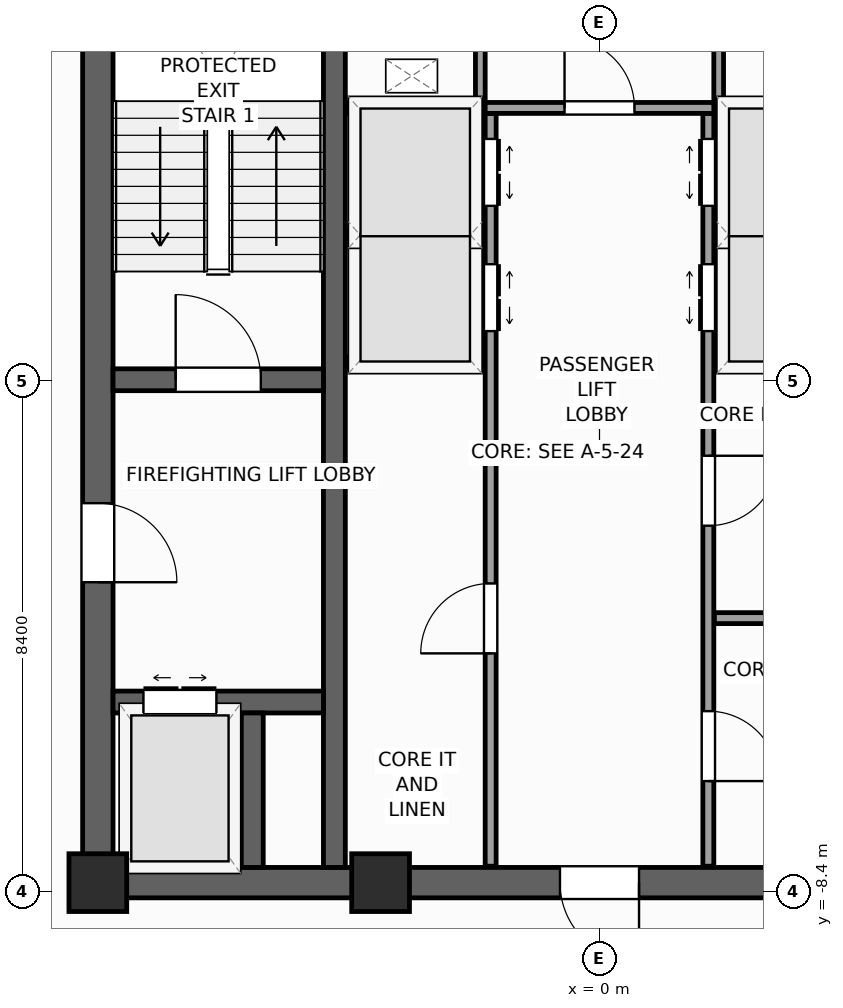
"""IFC4 building model, lengths in metres.
Left out: names, types, materials, properties, quantities, classifications, styles, units other than length and angle.
Written with IfcOpenShell. Run it as: python <this file> out.ifc"""

import sys

from ifc_helpers import new_model, si_unit, direction, frame, frame_2d, origin, origin_2d, place, context, subcontext, project, spatial, rectangle, extrude, source, transform, mapped, element, fill, save


model = new_model("IFC4")
c1 = context("Model", 3, precision=1e-05, world=origin(), true_north=direction((0.0, 1.0)))
c2 = subcontext(c1, "Body", "Model", "MODEL_VIEW")
j1 = project(units=[si_unit("LENGTHUNIT", "METRE"), si_unit("PLANEANGLEUNIT", "RADIAN")], contexts=[c1])
p1 = place(None, origin())
s1 = spatial("IfcSite", under=j1, at=p1, CompositionType="ELEMENT")
p2 = place(p1, origin())
s2 = spatial("IfcBuilding", under=s1, at=p2, CompositionType="ELEMENT")
p3 = place(p2, frame((0.0, 0.0, 240.7)))
s3 = spatial("IfcBuildingStorey", under=s2, at=p3, CompositionType="ELEMENT", Elevation=240.7)
p4 = place(p3, frame((-8.5, -8.25, 0.0), z_axis=(0.0, 0.0, 1.0), x_axis=(1.0, 0.0, 0.0)))
e1 = element("IfcWall", 1, at=p4, inside=s3, PredefinedType="SHEAR", context=c2, shape_type="SweptSolid", body=[
    extrude(rectangle(XDim=17.0, YDim=0.5, at=frame_2d((8.5, 0.0))), origin(), (0.0, 0.0, 1.0), 3.9),
])
p5 = place(p4, frame((7.85, 0.0, 0.0)))
e2 = element("IfcOpeningElement", 2, at=p5, cuts=e1, PredefinedType="OPENING", context=c2, shape_type="SweptSolid", body=[
    extrude(rectangle(XDim=1.3, YDim=2.2, at=frame_2d((0.65, 1.1))), frame((0.0, 0.26, 0.0), z_axis=(0.0, -1.0, 0.0), x_axis=(1.0, 0.0, 0.0)), (0.0, 0.0, 1.0), 0.52),
])
p6 = place(p3, frame((-8.25, -8.0, 0.0), z_axis=(0.0, 0.0, 1.0), x_axis=(0.0, 1.0, 0.0)))
e3 = element("IfcWall", 3, at=p6, inside=s3, PredefinedType="SHEAR", context=c2, shape_type="SweptSolid", body=[
    extrude(rectangle(XDim=16.0, YDim=0.5, at=frame_2d((8.0, 0.0))), origin(), (0.0, 0.0, 1.0), 3.9),
])
p7 = place(p6, frame((4.69, 0.0, 0.0)))
e4 = element("IfcOpeningElement", 4, at=p7, cuts=e3, PredefinedType="OPENING", context=c2, shape_type="SweptSolid", body=[
    extrude(rectangle(XDim=1.3, YDim=2.2, at=frame_2d((0.65, 1.1))), frame((0.0, 0.26, 0.0), z_axis=(0.0, -1.0, 0.0), x_axis=(1.0, 0.0, 0.0)), (0.0, 0.0, 1.0), 0.52),
])
p8 = place(p3, frame((-4.36, -8.0, 0.0), z_axis=(0.0, 0.0, 1.0), x_axis=(0.0, 1.0, 0.0)))
e5 = element("IfcWall", 5, at=p8, inside=s3, PredefinedType="SHEAR", context=c2, shape_type="SweptSolid", body=[
    extrude(rectangle(XDim=16.0, YDim=0.36, at=frame_2d((8.0, 0.0))), origin(), (0.0, 0.0, 1.0), 3.9),
])
p9 = place(p3, frame((-8.0, 0.02, 0.0), z_axis=(0.0, 0.0, 1.0), x_axis=(1.0, 0.0, 0.0)))
e6 = element("IfcWall", 6, at=p9, inside=s3, PredefinedType="SHEAR", context=c2, shape_type="SweptSolid", body=[
    extrude(rectangle(XDim=3.46, YDim=0.36, at=frame_2d((1.73, 0.0))), origin(), (0.0, 0.0, 1.0), 3.9),
])
p10 = place(p9, frame((1.03, 0.0, 0.0)))
e7 = element("IfcOpeningElement", 7, at=p10, cuts=e6, PredefinedType="OPENING", context=c2, shape_type="SweptSolid", body=[
    extrude(rectangle(XDim=1.4, YDim=2.2, at=frame_2d((0.7, 1.1))), frame((0.0, 0.19, 0.0), z_axis=(0.0, -1.0, 0.0), x_axis=(1.0, 0.0, 0.0)), (0.0, 0.0, 1.0), 0.38),
])
p11 = place(p3, frame((-8.0, -5.28, 0.0), z_axis=(0.0, 0.0, 1.0), x_axis=(1.0, 0.0, 0.0)))
e8 = element("IfcWall", 8, at=p11, inside=s3, PredefinedType="SHEAR", context=c2, shape_type="SweptSolid", body=[
    extrude(rectangle(XDim=3.46, YDim=0.36, at=frame_2d((1.73, 0.0))), origin(), (0.0, 0.0, 1.0), 3.9),
])
p12 = place(p11, frame((0.5, 0.0, 0.0)))
e9 = element("IfcOpeningElement", 9, at=p12, cuts=e8, PredefinedType="OPENING", context=c2, shape_type="SweptSolid", body=[
    extrude(rectangle(XDim=1.2, YDim=2.25, at=frame_2d((0.6, 1.125))), frame((0.0, 0.19, 0.0), z_axis=(0.0, -1.0, 0.0), x_axis=(1.0, 0.0, 0.0)), (0.0, 0.0, 1.0), 0.38),
])
p13 = place(p3, frame((-5.71, -8.0, 0.0), z_axis=(0.0, 0.0, 1.0), x_axis=(0.0, 1.0, 0.0)))
e10 = element("IfcWall", 10, at=p13, inside=s3, PredefinedType="SHEAR", context=c2, shape_type="SweptSolid", body=[
    extrude(rectangle(XDim=2.54, YDim=0.36, at=frame_2d((1.27, 0.0))), origin(), (0.0, 0.0, 1.0), 3.9),
])
m1 = source(origin(), c2, "Body", "SweptSolid", [
    extrude(rectangle(XDim=0.95, YDim=0.95, at=origin_2d()), origin(), (0.0, 0.0, 1.0), 3.9),
])
for number, where, z_axis, x_axis in (
    (11, (-8.25, -8.25, 0.0), (0.0, 0.0, 1.0), (1.0, 0.0, 0.0)),
    (12, (-3.6, -8.25, 0.0), (0.0, 0.0, 1.0), (1.0, 0.0, 0.0)),
):
    element("IfcColumn", number, at=place(p3, frame(where, z_axis=z_axis, x_axis=x_axis)), inside=s3, PredefinedType="PILASTER", context=c2, shape_type="MappedRepresentation", body=[
        mapped(m1, transform((0.0, 0.0, 0.0), scale=1.0)),
    ])
p14 = place(p3, frame((-6.733, 29.154, 0.0), z_axis=(0.0, 0.0, 1.0), x_axis=(-0.629325378072, -0.77714192302, 0.0)))
e13 = element("IfcWall", 13, at=p14, inside=s3, PredefinedType="STANDARD", context=c2, shape_type="SweptSolid", body=[
    extrude(rectangle(XDim=36.84, YDim=0.34, at=frame_2d((18.42, 0.0))), origin(), (0.0, 0.0, 1.0), 2.96),
])
p15 = place(p14, frame((3.721, 0.0, 0.48)))
e14 = element("IfcOpeningElement", 14, at=p15, cuts=e13, PredefinedType="OPENING", context=c2, shape_type="SweptSolid", body=[
    extrude(rectangle(XDim=1.4, YDim=2.4, at=frame_2d((0.7, 1.2))), frame((0.0, 0.18, 0.0), z_axis=(0.0, -1.0, 0.0), x_axis=(1.0, 0.0, 0.0)), (0.0, 0.0, 1.0), 0.36),
])
p16 = place(p14, frame((10.559, 0.0, 0.58)))
e15 = element("IfcOpeningElement", 15, at=p16, cuts=e13, PredefinedType="OPENING", context=c2, shape_type="SweptSolid", body=[
    extrude(rectangle(XDim=1.75, YDim=2.3, at=frame_2d((0.875, 1.15))), frame((0.0, 0.18, 0.0), z_axis=(0.0, -1.0, 0.0), x_axis=(1.0, 0.0, 0.0)), (0.0, 0.0, 1.0), 0.36),
])
p17 = place(p14, frame((16.058, 0.0, 0.58)))
e16 = element("IfcOpeningElement", 16, at=p17, cuts=e13, PredefinedType="OPENING", context=c2, shape_type="SweptSolid", body=[
    extrude(rectangle(XDim=1.75, YDim=2.3, at=frame_2d((0.875, 1.15))), frame((0.0, 0.18, 0.0), z_axis=(0.0, -1.0, 0.0), x_axis=(1.0, 0.0, 0.0)), (0.0, 0.0, 1.0), 0.36),
])
p18 = place(p14, frame((24.176, 0.0, 0.58)))
e17 = element("IfcOpeningElement", 17, at=p18, cuts=e13, PredefinedType="OPENING", context=c2, shape_type="SweptSolid", body=[
    extrude(rectangle(XDim=1.75, YDim=2.3, at=frame_2d((0.875, 1.15))), frame((0.0, 0.18, 0.0), z_axis=(0.0, -1.0, 0.0), x_axis=(1.0, 0.0, 0.0)), (0.0, 0.0, 1.0), 0.36),
])
p19 = place(p14, frame((30.982, 0.0, 0.48)))
e18 = element("IfcOpeningElement", 18, at=p19, cuts=e13, PredefinedType="OPENING", context=c2, shape_type="SweptSolid", body=[
    extrude(rectangle(XDim=1.4, YDim=2.4, at=frame_2d((0.7, 1.2))), frame((0.0, 0.18, 0.0), z_axis=(0.0, -1.0, 0.0), x_axis=(1.0, 0.0, 0.0)), (0.0, 0.0, 1.0), 0.36),
])
p20 = place(p3, frame((-29.154, -6.733, 0.0), z_axis=(0.0, 0.0, 1.0), x_axis=(0.77714192302, -0.629325378072, 0.0)))
e19 = element("IfcWall", 19, at=p20, inside=s3, PredefinedType="STANDARD", context=c2, shape_type="SweptSolid", body=[
    extrude(rectangle(XDim=36.84, YDim=0.34, at=frame_2d((18.42, 0.0))), origin(), (0.0, 0.0, 1.0), 2.96),
])
p21 = place(p20, frame((23.495, 0.0, 0.0)))
e20 = element("IfcOpeningElement", 20, at=p21, cuts=e19, PredefinedType="OPENING", context=c2, shape_type="SweptSolid", body=[
    extrude(rectangle(XDim=1.05, YDim=2.25, at=frame_2d((0.525, 1.125))), frame((0.0, 0.18, 0.0), z_axis=(0.0, -1.0, 0.0), x_axis=(1.0, 0.0, 0.0)), (0.0, 0.0, 1.0), 0.36),
])
p22 = place(p20, frame((3.721, 0.0, 0.48)))
e21 = element("IfcOpeningElement", 21, at=p22, cuts=e19, PredefinedType="OPENING", context=c2, shape_type="SweptSolid", body=[
    extrude(rectangle(XDim=1.4, YDim=2.4, at=frame_2d((0.7, 1.2))), frame((0.0, 0.18, 0.0), z_axis=(0.0, -1.0, 0.0), x_axis=(1.0, 0.0, 0.0)), (0.0, 0.0, 1.0), 0.36),
])
p23 = place(p20, frame((9.809, 0.0, 0.58)))
e22 = element("IfcOpeningElement", 22, at=p23, cuts=e19, PredefinedType="OPENING", context=c2, shape_type="SweptSolid", body=[
    extrude(rectangle(XDim=1.75, YDim=2.3, at=frame_2d((0.875, 1.15))), frame((0.0, 0.18, 0.0), z_axis=(0.0, -1.0, 0.0), x_axis=(1.0, 0.0, 0.0)), (0.0, 0.0, 1.0), 0.36),
])
p24 = place(p20, frame((16.058, 0.0, 0.58)))
e23 = element("IfcOpeningElement", 23, at=p24, cuts=e19, PredefinedType="OPENING", context=c2, shape_type="SweptSolid", body=[
    extrude(rectangle(XDim=1.75, YDim=2.3, at=frame_2d((0.875, 1.15))), frame((0.0, 0.18, 0.0), z_axis=(0.0, -1.0, 0.0), x_axis=(1.0, 0.0, 0.0)), (0.0, 0.0, 1.0), 0.36),
])
p25 = place(p20, frame((25.676, 0.0, 0.58)))
e24 = element("IfcOpeningElement", 24, at=p25, cuts=e19, PredefinedType="OPENING", context=c2, shape_type="SweptSolid", body=[
    extrude(rectangle(XDim=1.75, YDim=2.3, at=frame_2d((0.875, 1.15))), frame((0.0, 0.18, 0.0), z_axis=(0.0, -1.0, 0.0), x_axis=(1.0, 0.0, 0.0)), (0.0, 0.0, 1.0), 0.36),
])
p26 = place(p20, frame((32.482, 0.0, 0.48)))
e25 = element("IfcOpeningElement", 25, at=p26, cuts=e19, PredefinedType="OPENING", context=c2, shape_type="SweptSolid", body=[
    extrude(rectangle(XDim=1.4, YDim=2.4, at=frame_2d((0.7, 1.2))), frame((0.0, 0.18, 0.0), z_axis=(0.0, -1.0, 0.0), x_axis=(1.0, 0.0, 0.0)), (0.0, 0.0, 1.0), 0.36),
])
p27 = place(p3, frame((-1.79, -7.98, 0.0), z_axis=(0.0, 0.0, 1.0), x_axis=(0.0, 1.0, 0.0)))
e26 = element("IfcWall", 26, at=p27, inside=s3, PredefinedType="PARTITIONING", context=c2, shape_type="SweptSolid", body=[
    extrude(rectangle(XDim=12.38, YDim=0.18, at=frame_2d((6.19, 0.0))), origin(), (0.0, 0.0, 1.0), 3.66),
])
p28 = place(p27, frame((8.8, 0.0, 0.0)))
e27 = element("IfcOpeningElement", 27, at=p28, cuts=e26, PredefinedType="OPENING", context=c2, shape_type="SweptSolid", body=[
    extrude(rectangle(XDim=1.1, YDim=2.2, at=frame_2d((0.55, 1.1))), frame((0.0, 0.1, 0.0), z_axis=(0.0, -1.0, 0.0), x_axis=(1.0, 0.0, 0.0)), (0.0, 0.0, 1.0), 0.2),
])
p29 = place(p27, frame((10.86, 0.0, 0.0)))
e28 = element("IfcOpeningElement", 28, at=p29, cuts=e26, PredefinedType="OPENING", context=c2, shape_type="SweptSolid", body=[
    extrude(rectangle(XDim=1.1, YDim=2.2, at=frame_2d((0.55, 1.1))), frame((0.0, 0.1, 0.0), z_axis=(0.0, -1.0, 0.0), x_axis=(1.0, 0.0, 0.0)), (0.0, 0.0, 1.0), 0.2),
])
p30 = place(p27, frame((3.5, 0.0, 0.0)))
e29 = element("IfcOpeningElement", 29, at=p30, cuts=e26, PredefinedType="OPENING", context=c2, shape_type="SweptSolid", body=[
    extrude(rectangle(XDim=1.15, YDim=2.25, at=frame_2d((0.575, 1.125))), frame((0.0, 0.1, 0.0), z_axis=(0.0, -1.0, 0.0), x_axis=(1.0, 0.0, 0.0)), (0.0, 0.0, 1.0), 0.2),
])
p31 = place(p3, frame((1.79, -7.98, 0.0), z_axis=(0.0, 0.0, 1.0), x_axis=(0.0, 1.0, 0.0)))
e30 = element("IfcWall", 30, at=p31, inside=s3, PredefinedType="PARTITIONING", context=c2, shape_type="SweptSolid", body=[
    extrude(rectangle(XDim=12.38, YDim=0.18, at=frame_2d((6.19, 0.0))), origin(), (0.0, 0.0, 1.0), 3.66),
])
p32 = place(p31, frame((8.8, 0.0, 0.0)))
e31 = element("IfcOpeningElement", 31, at=p32, cuts=e30, PredefinedType="OPENING", context=c2, shape_type="SweptSolid", body=[
    extrude(rectangle(XDim=1.1, YDim=2.2, at=frame_2d((0.55, 1.1))), frame((0.0, 0.1, 0.0), z_axis=(0.0, -1.0, 0.0), x_axis=(1.0, 0.0, 0.0)), (0.0, 0.0, 1.0), 0.2),
])
p33 = place(p31, frame((10.86, 0.0, 0.0)))
e32 = element("IfcOpeningElement", 32, at=p33, cuts=e30, PredefinedType="OPENING", context=c2, shape_type="SweptSolid", body=[
    extrude(rectangle(XDim=1.1, YDim=2.2, at=frame_2d((0.55, 1.1))), frame((0.0, 0.1, 0.0), z_axis=(0.0, -1.0, 0.0), x_axis=(1.0, 0.0, 0.0)), (0.0, 0.0, 1.0), 0.2),
])
p34 = place(p31, frame((1.4, 0.0, 0.0)))
e33 = element("IfcOpeningElement", 33, at=p34, cuts=e30, PredefinedType="OPENING", context=c2, shape_type="SweptSolid", body=[
    extrude(rectangle(XDim=1.15, YDim=2.25, at=frame_2d((0.575, 1.125))), frame((0.0, 0.1, 0.0), z_axis=(0.0, -1.0, 0.0), x_axis=(1.0, 0.0, 0.0)), (0.0, 0.0, 1.0), 0.2),
])
p35 = place(p31, frame((5.6, 0.0, 0.0)))
e34 = element("IfcOpeningElement", 34, at=p35, cuts=e30, PredefinedType="OPENING", context=c2, shape_type="SweptSolid", body=[
    extrude(rectangle(XDim=1.15, YDim=2.25, at=frame_2d((0.575, 1.125))), frame((0.0, 0.1, 0.0), z_axis=(0.0, -1.0, 0.0), x_axis=(1.0, 0.0, 0.0)), (0.0, 0.0, 1.0), 0.2),
])
p36 = place(p3, frame((-1.88, 4.49, 0.0), z_axis=(0.0, 0.0, 1.0), x_axis=(1.0, 0.0, 0.0)))
e35 = element("IfcWall", 35, at=p36, inside=s3, PredefinedType="PARTITIONING", context=c2, shape_type="SweptSolid", body=[
    extrude(rectangle(XDim=3.76, YDim=0.18, at=frame_2d((1.88, 0.0))), origin(), (0.0, 0.0, 1.0), 3.66),
])
p37 = place(p36, frame((1.305, 0.0, 0.0)))
e36 = element("IfcOpeningElement", 36, at=p37, cuts=e35, PredefinedType="OPENING", context=c2, shape_type="SweptSolid", body=[
    extrude(rectangle(XDim=1.15, YDim=2.25, at=frame_2d((0.575, 1.125))), frame((0.0, 0.1, 0.0), z_axis=(0.0, -1.0, 0.0), x_axis=(1.0, 0.0, 0.0)), (0.0, 0.0, 1.0), 0.2),
])
for number, where, z_axis, x_axis in (
    (37, (1.89, -3.9, 0.0), (0.0, 0.0, 1.0), (1.0, 0.0, 0.0)),
    (38, (-4.17, 0.3, 0.0), (0.0, 0.0, 1.0), (1.0, 0.0, 0.0)),
    (39, (1.89, 0.3, 0.0), (0.0, 0.0, 1.0), (1.0, 0.0, 0.0)),
    (40, (-4.17, 4.49, 0.0), (0.0, 0.0, 1.0), (1.0, 0.0, 0.0)),
    (41, (1.89, 4.49, 0.0), (0.0, 0.0, 1.0), (1.0, 0.0, 0.0)),
):
    element("IfcWall", number, at=place(p3, frame(where, z_axis=z_axis, x_axis=x_axis)), inside=s3, PredefinedType="PARTITIONING", context=c2, shape_type="SweptSolid", body=[
        extrude(rectangle(XDim=2.28, YDim=0.18, at=frame_2d((1.14, 0.0))), origin(), (0.0, 0.0, 1.0), 3.66),
    ])
for number, where, z_axis, x_axis in (
    (42, (-4.16, 2.4, 0.0), (0.0, 0.0, 1.0), (1.0, 0.0, 0.0)),
    (43, (1.9, 2.4, 0.0), (0.0, 0.0, 1.0), (1.0, 0.0, 0.0)),
):
    element("IfcWall", number, at=place(p3, frame(where, z_axis=z_axis, x_axis=x_axis)), inside=s3, PredefinedType="PARTITIONING", context=c2, shape_type="SweptSolid", body=[
        extrude(rectangle(XDim=2.26, YDim=0.12, at=frame_2d((1.13, 0.0))), origin(), (0.0, 0.0, 1.0), 3.66),
    ])
for number, where, z_axis, x_axis in (
    (44, (-1.96, 4.58, 0.0), (0.0, 0.0, 1.0), (0.0, 1.0, 0.0)),
    (45, (1.96, 4.58, 0.0), (0.0, 0.0, 1.0), (0.0, 1.0, 0.0)),
):
    element("IfcWall", number, at=place(p3, frame(where, z_axis=z_axis, x_axis=x_axis)), inside=s3, PredefinedType="PARTITIONING", context=c2, shape_type="SweptSolid", body=[
        extrude(rectangle(XDim=3.4, YDim=0.16, at=frame_2d((1.7, 0.0))), origin(), (0.0, 0.0, 1.0), 3.66),
    ])
m2 = source(origin(), c2, "Body", "SweptSolid", [
    extrude(rectangle(XDim=1.4, YDim=2.2, at=frame_2d((0.7, 1.1))), frame((0.0, 0.025, 0.0), z_axis=(0.0, -1.0, 0.0), x_axis=(1.0, 0.0, 0.0)), (0.0, 0.0, 1.0), 0.05),
])
p38 = place(p10, origin())
e46 = element("IfcDoor", 46, at=p38, inside=s3, OperationType="SINGLE_SWING_LEFT", PredefinedType="DOOR", context=c2, shape_type="MappedRepresentation", body=[
    mapped(m2, transform((0.0, 0.0, 0.0), scale=1.0)),
])
fill(e7, e46)
m3 = source(origin(), c2, "Body", "SweptSolid", [
    extrude(rectangle(XDim=1.3, YDim=2.2, at=frame_2d((0.65, 1.1))), frame((0.0, 0.025, 0.0), z_axis=(0.0, -1.0, 0.0), x_axis=(1.0, 0.0, 0.0)), (0.0, 0.0, 1.0), 0.05),
])
p39 = place(p7, frame((1.3, 0.0, 0.0), z_axis=(0.0, 0.0, 1.0), x_axis=(-1.0, 0.0, 0.0)))
e47 = element("IfcDoor", 47, at=p39, inside=s3, OperationType="SINGLE_SWING_LEFT", PredefinedType="DOOR", context=c2, shape_type="MappedRepresentation", body=[
    mapped(m3, transform((0.0, 0.0, 0.0), scale=1.0)),
])
fill(e4, e47)
p40 = place(p5, frame((1.3, 0.0, 0.0), z_axis=(0.0, 0.0, 1.0), x_axis=(-1.0, 0.0, 0.0)))
e48 = element("IfcDoor", 48, at=p40, inside=s3, OperationType="SINGLE_SWING_RIGHT", PredefinedType="DOOR", context=c2, shape_type="MappedRepresentation", body=[
    mapped(m3, transform((0.0, 0.0, 0.0), scale=1.0)),
])
fill(e2, e48)
m4 = source(origin(), c2, "Body", "SweptSolid", [
    extrude(rectangle(XDim=1.2, YDim=2.25, at=frame_2d((0.6, 1.125))), frame((0.0, 0.025, 0.0), z_axis=(0.0, -1.0, 0.0), x_axis=(1.0, 0.0, 0.0)), (0.0, 0.0, 1.0), 0.05),
])
p41 = place(p12, origin())
e49 = element("IfcDoor", 49, at=p41, inside=s3, OperationType="DOUBLE_DOOR_SLIDING", PredefinedType="DOOR", context=c2, shape_type="MappedRepresentation", body=[
    mapped(m4, transform((0.0, 0.0, 0.0), scale=1.0)),
])
fill(e9, e49)
m5 = source(origin(), c2, "Body", "SweptSolid", [
    extrude(rectangle(XDim=1.1, YDim=2.2, at=frame_2d((0.55, 1.1))), frame((0.0, 0.025, 0.0), z_axis=(0.0, -1.0, 0.0), x_axis=(1.0, 0.0, 0.0)), (0.0, 0.0, 1.0), 0.05),
])
p42 = place(p28, frame((1.1, 0.0, 0.0), z_axis=(0.0, 0.0, 1.0), x_axis=(-1.0, 0.0, 0.0)))
e50 = element("IfcDoor", 50, at=p42, inside=s3, OperationType="DOUBLE_DOOR_SLIDING", PredefinedType="DOOR", context=c2, shape_type="MappedRepresentation", body=[
    mapped(m5, transform((0.0, 0.0, 0.0), scale=1.0)),
])
fill(e27, e50)
p43 = place(p29, frame((1.1, 0.0, 0.0), z_axis=(0.0, 0.0, 1.0), x_axis=(-1.0, 0.0, 0.0)))
e51 = element("IfcDoor", 51, at=p43, inside=s3, OperationType="DOUBLE_DOOR_SLIDING", PredefinedType="DOOR", context=c2, shape_type="MappedRepresentation", body=[
    mapped(m5, transform((0.0, 0.0, 0.0), scale=1.0)),
])
fill(e28, e51)
p44 = place(p32, origin())
e52 = element("IfcDoor", 52, at=p44, inside=s3, OperationType="DOUBLE_DOOR_SLIDING", PredefinedType="DOOR", context=c2, shape_type="MappedRepresentation", body=[
    mapped(m5, transform((0.0, 0.0, 0.0), scale=1.0)),
])
fill(e31, e52)
p45 = place(p33, origin())
e53 = element("IfcDoor", 53, at=p45, inside=s3, OperationType="DOUBLE_DOOR_SLIDING", PredefinedType="DOOR", context=c2, shape_type="MappedRepresentation", body=[
    mapped(m5, transform((0.0, 0.0, 0.0), scale=1.0)),
])
fill(e32, e53)
m6 = source(origin(), c2, "Body", "SweptSolid", [
    extrude(rectangle(XDim=1.15, YDim=2.25, at=frame_2d((0.575, 1.125))), frame((0.0, 0.025, 0.0), z_axis=(0.0, -1.0, 0.0), x_axis=(1.0, 0.0, 0.0)), (0.0, 0.0, 1.0), 0.05),
])
p46 = place(p30, origin())
e54 = element("IfcDoor", 54, at=p46, inside=s3, OperationType="SINGLE_SWING_LEFT", PredefinedType="DOOR", context=c2, shape_type="MappedRepresentation", body=[
    mapped(m6, transform((0.0, 0.0, 0.0), scale=1.0)),
])
fill(e29, e54)
p47 = place(p34, frame((1.15, 0.0, 0.0), z_axis=(0.0, 0.0, 1.0), x_axis=(-1.0, 0.0, 0.0)))
e55 = element("IfcDoor", 55, at=p47, inside=s3, OperationType="SINGLE_SWING_LEFT", PredefinedType="DOOR", context=c2, shape_type="MappedRepresentation", body=[
    mapped(m6, transform((0.0, 0.0, 0.0), scale=1.0)),
])
fill(e33, e55)
p48 = place(p35, frame((1.15, 0.0, 0.0), z_axis=(0.0, 0.0, 1.0), x_axis=(-1.0, 0.0, 0.0)))
e56 = element("IfcDoor", 56, at=p48, inside=s3, OperationType="SINGLE_SWING_RIGHT", PredefinedType="DOOR", context=c2, shape_type="MappedRepresentation", body=[
    mapped(m6, transform((0.0, 0.0, 0.0), scale=1.0)),
])
fill(e34, e56)
p49 = place(p37, origin())
e57 = element("IfcDoor", 57, at=p49, inside=s3, OperationType="SINGLE_SWING_LEFT", PredefinedType="DOOR", context=c2, shape_type="MappedRepresentation", body=[
    mapped(m6, transform((0.0, 0.0, 0.0), scale=1.0)),
])
fill(e36, e57)
save(model, sys.argv[1])
